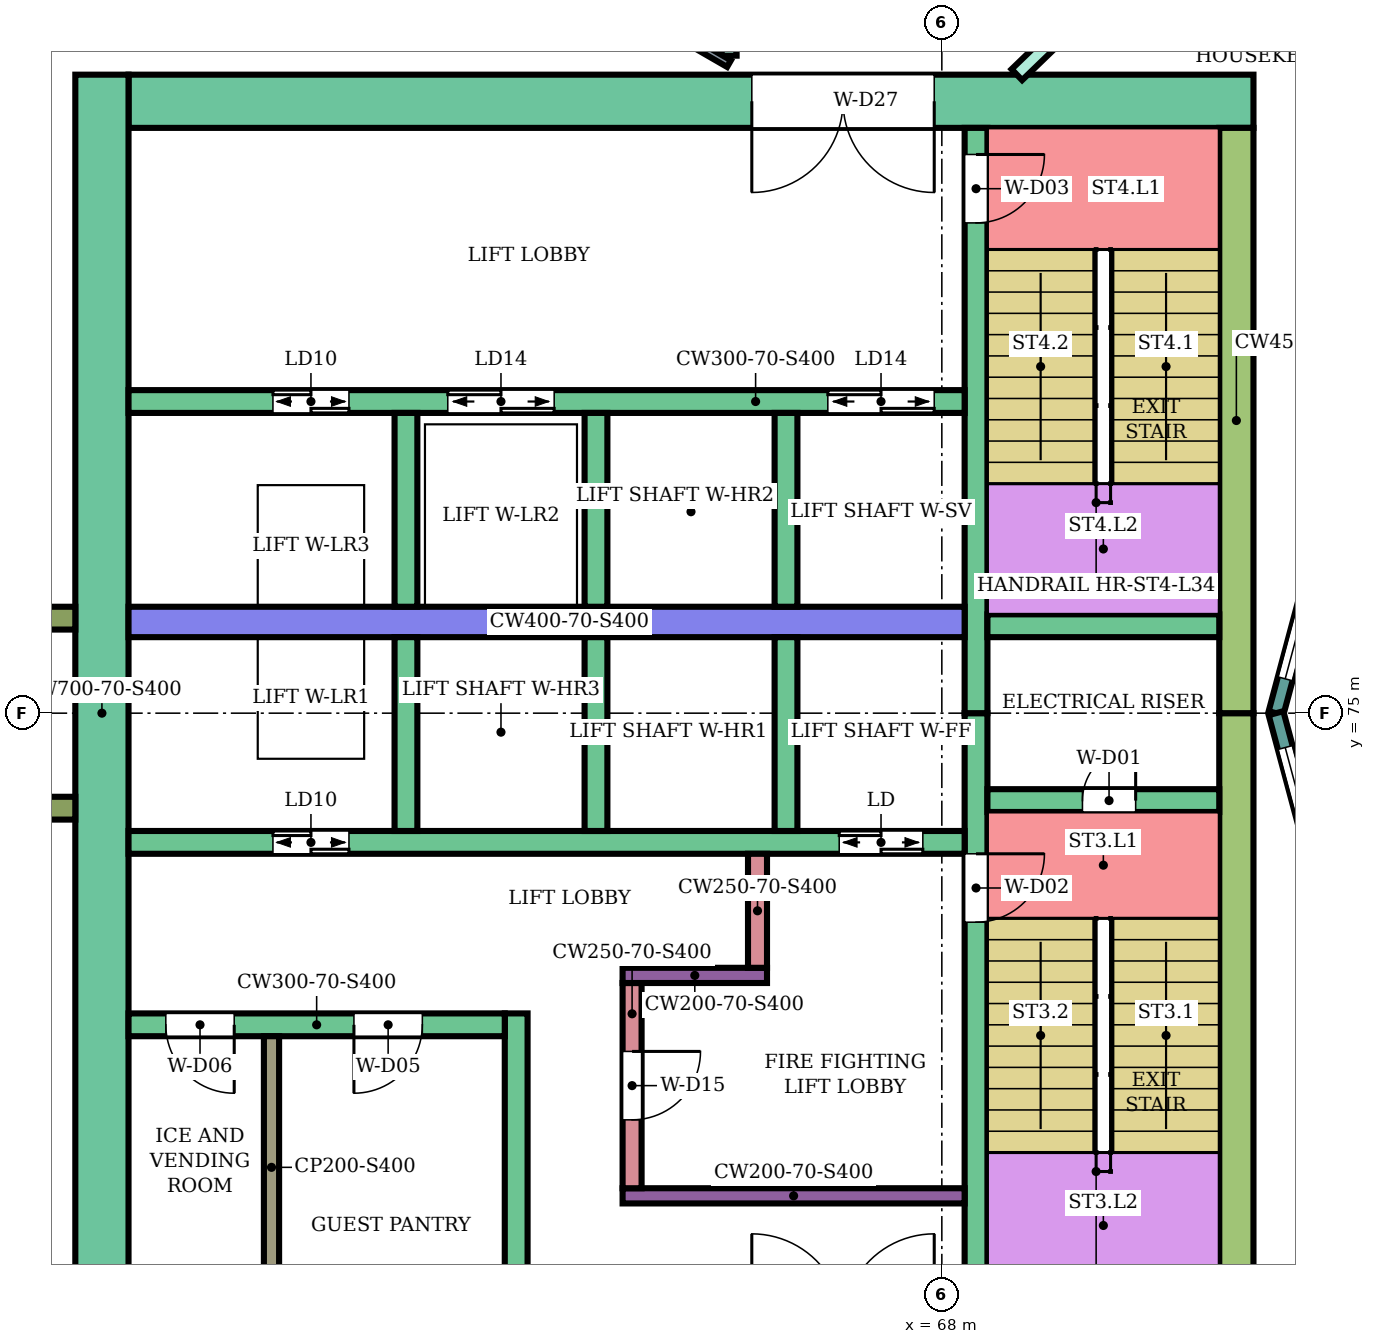
"""IFC4 building model, lengths in metres.
Left out: names, types, materials, properties, quantities, classifications, styles, units other than length and angle.
Written with IfcOpenShell. Run it as: python <this file> out.ifc"""

import sys

from ifc_helpers import new_model, si_unit, direction, frame, frame_2d, origin, place, context, subcontext, project, spatial, rectangle, extrude, element, fill, save


model = new_model("IFC4")
c1 = context("Model", 3, precision=1e-05, world=origin(), true_north=direction((0.0, 1.0)))
c2 = subcontext(c1, "Body", "Model", "MODEL_VIEW")
j1 = project(units=[si_unit("LENGTHUNIT", "METRE"), si_unit("PLANEANGLEUNIT", "RADIAN")], contexts=[c1])
p1 = place(None, origin())
s1 = spatial("IfcSite", under=j1, at=p1, CompositionType="ELEMENT")
p2 = place(p1, origin())
s2 = spatial("IfcBuilding", under=s1, at=p2, CompositionType="ELEMENT")
p3 = place(p2, frame((0.0, 0.0, 145.8)))
s3 = spatial("IfcBuildingStorey", under=s2, at=p3, CompositionType="ELEMENT", Elevation=145.8)
p4 = place(p3, frame((72.1, 83.05, 0.0), z_axis=(0.0, 0.0, 1.0), x_axis=(-1.0, 0.0, 0.0)))
e1 = element("IfcWall", 1, at=p4, inside=s3, PredefinedType="SHEAR", context=c2, shape_type="SweptSolid", body=[
    extrude(rectangle(XDim=14.8, YDim=0.7, at=frame_2d((7.4, 0.0))), origin(), (0.0, 0.0, 1.0), 3.5),
])
p5 = place(p4, frame((4.2, 0.0, 0.0)))
e2 = element("IfcOpeningElement", 2, at=p5, cuts=e1, PredefinedType="OPENING", context=c2, shape_type="SweptSolid", body=[
    extrude(rectangle(XDim=2.4, YDim=2.4, at=frame_2d((1.2, 1.2))), frame((0.0, 0.36, 0.0), z_axis=(0.0, -1.0, 0.0), x_axis=(1.0, 0.0, 0.0)), (0.0, 0.0, 1.0), 0.72),
])
for number, where, z_axis, x_axis in (
    (3, (71.875, 75.0, 0.0), (0.0, 0.0, 1.0), (0.0, -1.0, 0.0)),
    (4, (71.875, 82.7, 0.0), (0.0, 0.0, 1.0), (0.0, -1.0, 0.0)),
):
    element("IfcWall", number, at=place(p3, frame(where, z_axis=z_axis, x_axis=x_axis)), inside=s3, PredefinedType="SHEAR", context=c2, shape_type="SweptSolid", body=[
        extrude(rectangle(XDim=7.7, YDim=0.45, at=frame_2d((3.85, 0.0))), origin(), (0.0, 0.0, 1.0), 3.5),
    ])
p6 = place(p3, frame((56.95, 83.4, 0.0), z_axis=(0.0, 0.0, 1.0), x_axis=(0.0, -1.0, 0.0)))
e5 = element("IfcWall", 5, at=p6, inside=s3, PredefinedType="SHEAR", context=c2, shape_type="SweptSolid", body=[
    extrude(rectangle(XDim=16.8, YDim=0.7, at=frame_2d((8.4, 0.0))), origin(), (0.0, 0.0, 1.0), 3.5),
])
p7 = place(p3, frame((68.45, 75.0, 0.0), z_axis=(0.0, 0.0, 1.0), x_axis=(0.0, -1.0, 0.0)))
e6 = element("IfcWall", 6, at=p7, inside=s3, PredefinedType="SHEAR", context=c2, shape_type="SweptSolid", body=[
    extrude(rectangle(XDim=7.7, YDim=0.3, at=frame_2d((3.85, 0.0))), origin(), (0.0, 0.0, 1.0), 3.5),
])
p8 = place(p7, frame((1.85, 0.0, 0.0)))
e7 = element("IfcOpeningElement", 7, at=p8, cuts=e6, PredefinedType="OPENING", context=c2, shape_type="SweptSolid", body=[
    extrude(rectangle(XDim=0.9, YDim=2.1, at=frame_2d((0.45, 1.05))), frame((0.0, 0.16, 0.0), z_axis=(0.0, -1.0, 0.0), x_axis=(1.0, 0.0, 0.0)), (0.0, 0.0, 1.0), 0.32),
])
p9 = place(p3, frame((68.45, 82.7, 0.0), z_axis=(0.0, 0.0, 1.0), x_axis=(0.0, -1.0, 0.0)))
e8 = element("IfcWall", 8, at=p9, inside=s3, PredefinedType="SHEAR", context=c2, shape_type="SweptSolid", body=[
    extrude(rectangle(XDim=7.7, YDim=0.3, at=frame_2d((3.85, 0.0))), origin(), (0.0, 0.0, 1.0), 3.5),
])
p10 = place(p9, frame((0.35, 0.0, 0.0)))
e9 = element("IfcOpeningElement", 9, at=p10, cuts=e8, PredefinedType="OPENING", context=c2, shape_type="SweptSolid", body=[
    extrude(rectangle(XDim=0.9, YDim=2.1, at=frame_2d((0.45, 1.05))), frame((0.0, 0.16, 0.0), z_axis=(0.0, -1.0, 0.0), x_axis=(1.0, 0.0, 0.0)), (0.0, 0.0, 1.0), 0.32),
])
p11 = place(p3, frame((71.65, 73.85, 0.0), z_axis=(0.0, 0.0, 1.0), x_axis=(-1.0, 0.0, 0.0)))
e10 = element("IfcWall", 10, at=p11, inside=s3, PredefinedType="SHEAR", context=c2, shape_type="SweptSolid", body=[
    extrude(rectangle(XDim=3.05, YDim=0.3, at=frame_2d((1.525, 0.0))), origin(), (0.0, 0.0, 1.0), 3.5),
])
p12 = place(p11, frame((1.1, 0.0, 0.0)))
e11 = element("IfcOpeningElement", 11, at=p12, cuts=e10, PredefinedType="OPENING", context=c2, shape_type="SweptSolid", body=[
    extrude(rectangle(XDim=0.7, YDim=2.0, at=frame_2d((0.35, 1.0))), frame((0.0, 0.16, 0.0), z_axis=(0.0, -1.0, 0.0), x_axis=(1.0, 0.0, 0.0)), (0.0, 0.0, 1.0), 0.32),
])
p13 = place(p3, frame((71.65, 76.15, 0.0), z_axis=(0.0, 0.0, 1.0), x_axis=(-1.0, 0.0, 0.0)))
e12 = element("IfcWall", 12, at=p13, inside=s3, PredefinedType="SHEAR", context=c2, shape_type="SweptSolid", body=[
    extrude(rectangle(XDim=3.05, YDim=0.3, at=frame_2d((1.525, 0.0))), origin(), (0.0, 0.0, 1.0), 3.5),
])
p14 = place(p3, frame((68.3, 73.3, 0.0), z_axis=(0.0, 0.0, 1.0), x_axis=(-1.0, 0.0, 0.0)))
e13 = element("IfcWall", 13, at=p14, inside=s3, PredefinedType="SHEAR", context=c2, shape_type="SweptSolid", body=[
    extrude(rectangle(XDim=11.0, YDim=0.3, at=frame_2d((5.5, 0.0))), origin(), (0.0, 0.0, 1.0), 3.5),
])
p15 = place(p14, frame((0.55, 0.0, 0.0)))
e14 = element("IfcOpeningElement", 14, at=p15, cuts=e13, PredefinedType="OPENING", context=c2, shape_type="SweptSolid", body=[
    extrude(rectangle(XDim=1.1, YDim=2.1, at=frame_2d((0.55, 1.05))), frame((0.0, 0.16, 0.0), z_axis=(0.0, -1.0, 0.0), x_axis=(1.0, 0.0, 0.0)), (0.0, 0.0, 1.0), 0.32),
])
p16 = place(p14, frame((8.1, 0.0, 0.0)))
e15 = element("IfcOpeningElement", 15, at=p16, cuts=e13, PredefinedType="OPENING", context=c2, shape_type="SweptSolid", body=[
    extrude(rectangle(XDim=1.0, YDim=2.1, at=frame_2d((0.5, 1.05))), frame((0.0, 0.16, 0.0), z_axis=(0.0, -1.0, 0.0), x_axis=(1.0, 0.0, 0.0)), (0.0, 0.0, 1.0), 0.32),
])
p17 = place(p3, frame((68.3, 76.2, 0.0), z_axis=(0.0, 0.0, 1.0), x_axis=(-1.0, 0.0, 0.0)))
e16 = element("IfcWall", 16, at=p17, inside=s3, PredefinedType="SHEAR", context=c2, shape_type="SweptSolid", body=[
    extrude(rectangle(XDim=11.0, YDim=0.4, at=frame_2d((5.5, 0.0))), origin(), (0.0, 0.0, 1.0), 3.5),
])
p18 = place(p3, frame((68.3, 79.1, 0.0), z_axis=(0.0, 0.0, 1.0), x_axis=(-1.0, 0.0, 0.0)))
e17 = element("IfcWall", 17, at=p18, inside=s3, PredefinedType="SHEAR", context=c2, shape_type="SweptSolid", body=[
    extrude(rectangle(XDim=11.0, YDim=0.3, at=frame_2d((5.5, 0.0))), origin(), (0.0, 0.0, 1.0), 3.5),
])
p19 = place(p18, frame((0.4, 0.0, 0.0)))
e18 = element("IfcOpeningElement", 18, at=p19, cuts=e17, PredefinedType="OPENING", context=c2, shape_type="SweptSolid", body=[
    extrude(rectangle(XDim=1.4, YDim=2.1, at=frame_2d((0.7, 1.05))), frame((0.0, 0.16, 0.0), z_axis=(0.0, -1.0, 0.0), x_axis=(1.0, 0.0, 0.0)), (0.0, 0.0, 1.0), 0.32),
])
p20 = place(p18, frame((5.4, 0.0, 0.0)))
e19 = element("IfcOpeningElement", 19, at=p20, cuts=e17, PredefinedType="OPENING", context=c2, shape_type="SweptSolid", body=[
    extrude(rectangle(XDim=1.4, YDim=2.1, at=frame_2d((0.7, 1.05))), frame((0.0, 0.16, 0.0), z_axis=(0.0, -1.0, 0.0), x_axis=(1.0, 0.0, 0.0)), (0.0, 0.0, 1.0), 0.32),
])
p21 = place(p18, frame((8.1, 0.0, 0.0)))
e20 = element("IfcOpeningElement", 20, at=p21, cuts=e17, PredefinedType="OPENING", context=c2, shape_type="SweptSolid", body=[
    extrude(rectangle(XDim=1.0, YDim=2.1, at=frame_2d((0.5, 1.05))), frame((0.0, 0.16, 0.0), z_axis=(0.0, -1.0, 0.0), x_axis=(1.0, 0.0, 0.0)), (0.0, 0.0, 1.0), 0.32),
])
for number, where, z_axis, x_axis in (
    (21, (65.95, 76.0, 0.0), (0.0, 0.0, 1.0), (0.0, -1.0, 0.0)),
    (22, (63.45, 76.0, 0.0), (0.0, 0.0, 1.0), (0.0, -1.0, 0.0)),
    (23, (60.95, 76.0, 0.0), (0.0, 0.0, 1.0), (0.0, -1.0, 0.0)),
    (24, (65.95, 78.95, 0.0), (0.0, 0.0, 1.0), (0.0, -1.0, 0.0)),
    (25, (63.45, 78.95, 0.0), (0.0, 0.0, 1.0), (0.0, -1.0, 0.0)),
    (26, (60.95, 78.95, 0.0), (0.0, 0.0, 1.0), (0.0, -1.0, 0.0)),
):
    element("IfcWall", number, at=place(p3, frame(where, z_axis=z_axis, x_axis=x_axis)), inside=s3, PredefinedType="SHEAR", context=c2, shape_type="SweptSolid", body=[
        extrude(rectangle(XDim=2.55, YDim=0.3, at=frame_2d((1.275, 0.0))), origin(), (0.0, 0.0, 1.0), 3.5),
    ])
p22 = place(p3, frame((68.3, 68.65, 0.0), z_axis=(0.0, 0.0, 1.0), x_axis=(-1.0, 0.0, 0.0)))
e27 = element("IfcWall", 27, at=p22, inside=s3, PredefinedType="SHEAR", context=c2, shape_type="SweptSolid", body=[
    extrude(rectangle(XDim=4.5, YDim=0.2, at=frame_2d((2.25, 0.0))), origin(), (0.0, 0.0, 1.0), 3.5),
])
p23 = place(p3, frame((63.925, 71.45, 0.0), z_axis=(0.0, 0.0, 1.0), x_axis=(0.0, -1.0, 0.0)))
e28 = element("IfcWall", 28, at=p23, inside=s3, PredefinedType="SHEAR", context=c2, shape_type="SweptSolid", body=[
    extrude(rectangle(XDim=2.7, YDim=0.25, at=frame_2d((1.35, 0.0))), origin(), (0.0, 0.0, 1.0), 3.5),
])
p24 = place(p23, frame((0.9, 0.0, 0.0)))
e29 = element("IfcOpeningElement", 29, at=p24, cuts=e28, PredefinedType="OPENING", context=c2, shape_type="SweptSolid", body=[
    extrude(rectangle(XDim=0.9, YDim=2.1, at=frame_2d((0.45, 1.05))), frame((0.0, 0.135, 0.0), z_axis=(0.0, -1.0, 0.0), x_axis=(1.0, 0.0, 0.0)), (0.0, 0.0, 1.0), 0.27),
])
p25 = place(p3, frame((65.7, 71.55, 0.0), z_axis=(0.0, 0.0, 1.0), x_axis=(-1.0, 0.0, 0.0)))
e30 = element("IfcWall", 30, at=p25, inside=s3, PredefinedType="SHEAR", context=c2, shape_type="SweptSolid", body=[
    extrude(rectangle(XDim=1.9, YDim=0.2, at=frame_2d((0.95, 0.0))), origin(), (0.0, 0.0, 1.0), 3.5),
])
p26 = place(p3, frame((65.575, 73.15, 0.0), z_axis=(0.0, 0.0, 1.0), x_axis=(0.0, -1.0, 0.0)))
e31 = element("IfcWall", 31, at=p26, inside=s3, PredefinedType="SHEAR", context=c2, shape_type="SweptSolid", body=[
    extrude(rectangle(XDim=1.5, YDim=0.25, at=frame_2d((0.75, 0.0))), origin(), (0.0, 0.0, 1.0), 3.5),
])
p27 = place(p3, frame((62.4, 71.05, 0.0), z_axis=(0.0, 0.0, 1.0), x_axis=(0.0, -1.0, 0.0)))
e32 = element("IfcWall", 32, at=p27, inside=s3, PredefinedType="SHEAR", context=c2, shape_type="SweptSolid", body=[
    extrude(rectangle(XDim=3.75, YDim=0.3, at=frame_2d((1.875, 0.0))), origin(), (0.0, 0.0, 1.0), 3.5),
])
p28 = place(p3, frame((62.25, 70.9, 0.0), z_axis=(0.0, 0.0, 1.0), x_axis=(-1.0, 0.0, 0.0)))
e33 = element("IfcWall", 33, at=p28, inside=s3, PredefinedType="SHEAR", context=c2, shape_type="SweptSolid", body=[
    extrude(rectangle(XDim=4.95, YDim=0.3, at=frame_2d((2.475, 0.0))), origin(), (0.0, 0.0, 1.0), 3.5),
])
p29 = place(p28, frame((1.084, 0.0, 0.0)))
e34 = element("IfcOpeningElement", 34, at=p29, cuts=e33, PredefinedType="OPENING", context=c2, shape_type="SweptSolid", body=[
    extrude(rectangle(XDim=0.9, YDim=2.1, at=frame_2d((0.45, 1.05))), frame((0.0, 0.16, 0.0), z_axis=(0.0, -1.0, 0.0), x_axis=(1.0, 0.0, 0.0)), (0.0, 0.0, 1.0), 0.32),
])
p30 = place(p28, frame((3.56, 0.0, 0.0)))
e35 = element("IfcOpeningElement", 35, at=p30, cuts=e33, PredefinedType="OPENING", context=c2, shape_type="SweptSolid", body=[
    extrude(rectangle(XDim=0.9, YDim=2.1, at=frame_2d((0.45, 1.05))), frame((0.0, 0.16, 0.0), z_axis=(0.0, -1.0, 0.0), x_axis=(1.0, 0.0, 0.0)), (0.0, 0.0, 1.0), 0.32),
])
for number, where, z_axis, x_axis in (
    (36, (56.6, 76.25, 0.0), (0.0, 0.0, 1.0), (-1.0, 0.0, 0.0)),
    (37, (56.6, 73.75, 0.0), (0.0, 0.0, 1.0), (-1.0, 0.0, 0.0)),
):
    element("IfcWall", number, at=place(p3, frame(where, z_axis=z_axis, x_axis=x_axis)), inside=s3, PredefinedType="NOTDEFINED", context=c2, shape_type="SweptSolid", body=[
        extrude(rectangle(XDim=2.416, YDim=0.3, at=frame_2d((1.208, 0.0))), origin(), (0.0, 0.0, 1.0), 3.9),
    ])
p31 = place(p3, frame((73.415, 78.802, 0.0), z_axis=(0.0, 0.0, 1.0), x_axis=(-0.258789828301, -0.965933654434, 0.0)))
e38 = element("IfcWall", 38, at=p31, inside=s3, PredefinedType="NOTDEFINED", context=c2, shape_type="SweptSolid", body=[
    extrude(rectangle(XDim=3.936, YDim=0.2, at=frame_2d((1.968, 0.0))), origin(), (0.0, 0.0, 1.0), 3.9),
])
p32 = place(p31, frame((0.468, 0.0, 0.9)))
e39 = element("IfcOpeningElement", 39, at=p32, cuts=e38, PredefinedType="OPENING", context=c2, shape_type="SweptSolid", body=[
    extrude(rectangle(XDim=3.0, YDim=2.3, at=frame_2d((1.5, 1.15))), frame((0.0, 0.11, 0.0), z_axis=(0.0, -1.0, 0.0), x_axis=(1.0, 0.0, 0.0)), (0.0, 0.0, 1.0), 0.22),
])
p33 = place(p3, frame((72.396, 75.0, 0.0), z_axis=(0.0, 0.0, 1.0), x_axis=(0.258789828301, -0.965933654434, 0.0)))
e40 = element("IfcWall", 40, at=p33, inside=s3, PredefinedType="NOTDEFINED", context=c2, shape_type="SweptSolid", body=[
    extrude(rectangle(XDim=3.936, YDim=0.2, at=frame_2d((1.968, 0.0))), origin(), (0.0, 0.0, 1.0), 3.9),
])
p34 = place(p33, frame((0.468, 0.0, 0.9)))
e41 = element("IfcOpeningElement", 41, at=p34, cuts=e40, PredefinedType="OPENING", context=c2, shape_type="SweptSolid", body=[
    extrude(rectangle(XDim=3.0, YDim=2.3, at=frame_2d((1.5, 1.15))), frame((0.0, 0.11, 0.0), z_axis=(0.0, -1.0, 0.0), x_axis=(1.0, 0.0, 0.0)), (0.0, 0.0, 1.0), 0.22),
])
p35 = place(p3, frame((65.2, 83.65, 0.0), z_axis=(0.0, 0.0, 1.0), x_axis=(0.0, 1.0, 0.0)))
e42 = element("IfcWall", 42, at=p35, inside=s3, PredefinedType="PARTITIONING", context=c2, shape_type="SweptSolid", body=[
    extrude(rectangle(XDim=1.15, YDim=0.2, at=frame_2d((0.575, 0.0))), origin(), (0.0, 0.0, 1.0), 3.45),
])
p36 = place(p3, frame((68.987, 83.4, 0.0), z_axis=(0.0, 0.0, 1.0), x_axis=(0.719547721855, 0.694442996922, 0.0)))
e43 = element("IfcWall", 43, at=p36, inside=s3, PredefinedType="PARTITIONING", context=c2, shape_type="SweptSolid", body=[
    extrude(rectangle(XDim=5.378, YDim=0.2, at=frame_2d((2.689, 0.0))), origin(), (0.0, 0.0, 1.0), 3.45),
])
p37 = place(p36, frame((2.294, 0.0, 0.0)))
e44 = element("IfcOpeningElement", 44, at=p37, cuts=e43, PredefinedType="OPENING", context=c2, shape_type="SweptSolid", body=[
    extrude(rectangle(XDim=0.9, YDim=2.1, at=frame_2d((0.45, 1.05))), frame((0.0, 0.11, 0.0), z_axis=(0.0, -1.0, 0.0), x_axis=(1.0, 0.0, 0.0)), (0.0, 0.0, 1.0), 0.22),
])
p38 = place(p3, frame((57.659, 87.899, 0.0), z_axis=(0.0, 0.0, 1.0), x_axis=(0.86602264145, -0.500004784474, 0.0)))
e45 = element("IfcWall", 45, at=p38, inside=s3, PredefinedType="PARTITIONING", context=c2, shape_type="SweptSolid", body=[
    extrude(rectangle(XDim=8.708, YDim=0.1, at=frame_2d((4.354, 0.0))), origin(), (0.0, 0.0, 1.0), 3.45),
])
p39 = place(p38, frame((3.929, 0.0, 0.0)))
e46 = element("IfcOpeningElement", 46, at=p39, cuts=e45, PredefinedType="OPENING", context=c2, shape_type="SweptSolid", body=[
    extrude(rectangle(XDim=0.9, YDim=2.1, at=frame_2d((0.45, 1.05))), frame((0.0, 0.06, 0.0), z_axis=(0.0, -1.0, 0.0), x_axis=(1.0, 0.0, 0.0)), (0.0, 0.0, 1.0), 0.12),
])
p40 = place(p3, frame((59.181, 70.75, 0.0), z_axis=(0.0, 0.0, 1.0), x_axis=(0.0, -1.0, 0.0)))
e47 = element("IfcWall", 47, at=p40, inside=s3, PredefinedType="PARTITIONING", context=c2, shape_type="SweptSolid", body=[
    extrude(rectangle(XDim=3.45, YDim=0.2, at=frame_2d((1.725, 0.0))), origin(), (0.0, 0.0, 1.0), 3.5),
])
p41 = place(p32, origin())
e48 = element("IfcWindow", 48, at=p41, inside=s3, PartitioningType="SINGLE_PANEL", PredefinedType="WINDOW", context=c2, shape_type="SweptSolid", body=[
    extrude(rectangle(XDim=3.0, YDim=2.3, at=frame_2d((1.5, 1.15))), frame((0.0, 0.03, 0.0), z_axis=(0.0, -1.0, 0.0), x_axis=(1.0, 0.0, 0.0)), (0.0, 0.0, 1.0), 0.06),
])
fill(e39, e48)
p42 = place(p34, origin())
e49 = element("IfcWindow", 49, at=p42, inside=s3, PartitioningType="SINGLE_PANEL", PredefinedType="WINDOW", context=c2, shape_type="SweptSolid", body=[
    extrude(rectangle(XDim=3.0, YDim=2.3, at=frame_2d((1.5, 1.15))), frame((0.0, 0.03, 0.0), z_axis=(0.0, -1.0, 0.0), x_axis=(1.0, 0.0, 0.0)), (0.0, 0.0, 1.0), 0.06),
])
fill(e41, e49)
p43 = place(p12, frame((0.7, 0.0, 0.0), z_axis=(0.0, 0.0, 1.0), x_axis=(-1.0, 0.0, 0.0)))
e50 = element("IfcDoor", 50, at=p43, inside=s3, OperationType="SINGLE_SWING_RIGHT", PredefinedType="DOOR", context=c2, shape_type="SweptSolid", body=[
    extrude(rectangle(XDim=0.7, YDim=2.0, at=frame_2d((0.35, 1.0))), frame((0.0, 0.025, 0.0), z_axis=(0.0, -1.0, 0.0), x_axis=(1.0, 0.0, 0.0)), (0.0, 0.0, 1.0), 0.05),
])
fill(e11, e50)
p44 = place(p8, origin())
e51 = element("IfcDoor", 51, at=p44, inside=s3, OperationType="SINGLE_SWING_LEFT", PredefinedType="DOOR", context=c2, shape_type="SweptSolid", body=[
    extrude(rectangle(XDim=0.9, YDim=2.1, at=frame_2d((0.45, 1.05))), frame((0.0, 0.025, 0.0), z_axis=(0.0, -1.0, 0.0), x_axis=(1.0, 0.0, 0.0)), (0.0, 0.0, 1.0), 0.05),
])
fill(e7, e51)
p45 = place(p10, origin())
e52 = element("IfcDoor", 52, at=p45, inside=s3, OperationType="SINGLE_SWING_LEFT", PredefinedType="DOOR", context=c2, shape_type="SweptSolid", body=[
    extrude(rectangle(XDim=0.9, YDim=2.1, at=frame_2d((0.45, 1.05))), frame((0.0, 0.025, 0.0), z_axis=(0.0, -1.0, 0.0), x_axis=(1.0, 0.0, 0.0)), (0.0, 0.0, 1.0), 0.05),
])
fill(e9, e52)
p46 = place(p15, origin())
e53 = element("IfcDoor", 53, at=p46, inside=s3, OperationType="DOUBLE_DOOR_SLIDING", PredefinedType="DOOR", context=c2, shape_type="SweptSolid", body=[
    extrude(rectangle(XDim=1.1, YDim=2.1, at=frame_2d((0.55, 1.05))), frame((0.0, 0.025, 0.0), z_axis=(0.0, -1.0, 0.0), x_axis=(1.0, 0.0, 0.0)), (0.0, 0.0, 1.0), 0.05),
])
fill(e14, e53)
p47 = place(p16, origin())
e54 = element("IfcDoor", 54, at=p47, inside=s3, OperationType="DOUBLE_DOOR_SLIDING", PredefinedType="DOOR", context=c2, shape_type="SweptSolid", body=[
    extrude(rectangle(XDim=1.0, YDim=2.1, at=frame_2d((0.5, 1.05))), frame((0.0, 0.025, 0.0), z_axis=(0.0, -1.0, 0.0), x_axis=(1.0, 0.0, 0.0)), (0.0, 0.0, 1.0), 0.05),
])
fill(e15, e54)
p48 = place(p19, origin())
e55 = element("IfcDoor", 55, at=p48, inside=s3, OperationType="DOUBLE_DOOR_SLIDING", PredefinedType="DOOR", context=c2, shape_type="SweptSolid", body=[
    extrude(rectangle(XDim=1.4, YDim=2.1, at=frame_2d((0.7, 1.05))), frame((0.0, 0.025, 0.0), z_axis=(0.0, -1.0, 0.0), x_axis=(1.0, 0.0, 0.0)), (0.0, 0.0, 1.0), 0.05),
])
fill(e18, e55)
p49 = place(p20, origin())
e56 = element("IfcDoor", 56, at=p49, inside=s3, OperationType="DOUBLE_DOOR_SLIDING", PredefinedType="DOOR", context=c2, shape_type="SweptSolid", body=[
    extrude(rectangle(XDim=1.4, YDim=2.1, at=frame_2d((0.7, 1.05))), frame((0.0, 0.025, 0.0), z_axis=(0.0, -1.0, 0.0), x_axis=(1.0, 0.0, 0.0)), (0.0, 0.0, 1.0), 0.05),
])
fill(e19, e56)
p50 = place(p21, origin())
e57 = element("IfcDoor", 57, at=p50, inside=s3, OperationType="DOUBLE_DOOR_SLIDING", PredefinedType="DOOR", context=c2, shape_type="SweptSolid", body=[
    extrude(rectangle(XDim=1.0, YDim=2.1, at=frame_2d((0.5, 1.05))), frame((0.0, 0.025, 0.0), z_axis=(0.0, -1.0, 0.0), x_axis=(1.0, 0.0, 0.0)), (0.0, 0.0, 1.0), 0.05),
])
fill(e20, e57)
p51 = place(p24, origin())
e58 = element("IfcDoor", 58, at=p51, inside=s3, OperationType="SINGLE_SWING_LEFT", PredefinedType="DOOR", context=c2, shape_type="SweptSolid", body=[
    extrude(rectangle(XDim=0.9, YDim=2.1, at=frame_2d((0.45, 1.05))), frame((0.0, 0.025, 0.0), z_axis=(0.0, -1.0, 0.0), x_axis=(1.0, 0.0, 0.0)), (0.0, 0.0, 1.0), 0.05),
])
fill(e29, e58)
p52 = place(p29, origin())
e59 = element("IfcDoor", 59, at=p52, inside=s3, OperationType="SINGLE_SWING_RIGHT", PredefinedType="DOOR", context=c2, shape_type="SweptSolid", body=[
    extrude(rectangle(XDim=0.9, YDim=2.1, at=frame_2d((0.45, 1.05))), frame((0.0, 0.025, 0.0), z_axis=(0.0, -1.0, 0.0), x_axis=(1.0, 0.0, 0.0)), (0.0, 0.0, 1.0), 0.05),
])
fill(e34, e59)
p53 = place(p30, origin())
e60 = element("IfcDoor", 60, at=p53, inside=s3, OperationType="SINGLE_SWING_LEFT", PredefinedType="DOOR", context=c2, shape_type="SweptSolid", body=[
    extrude(rectangle(XDim=0.9, YDim=2.1, at=frame_2d((0.45, 1.05))), frame((0.0, 0.025, 0.0), z_axis=(0.0, -1.0, 0.0), x_axis=(1.0, 0.0, 0.0)), (0.0, 0.0, 1.0), 0.05),
])
fill(e35, e60)
p54 = place(p5, origin())
e61 = element("IfcDoor", 61, at=p54, inside=s3, OperationType="DOUBLE_DOOR_SINGLE_SWING", PredefinedType="DOOR", context=c2, shape_type="SweptSolid", body=[
    extrude(rectangle(XDim=2.4, YDim=2.4, at=frame_2d((1.2, 1.2))), frame((0.0, 0.025, 0.0), z_axis=(0.0, -1.0, 0.0), x_axis=(1.0, 0.0, 0.0)), (0.0, 0.0, 1.0), 0.05),
])
fill(e2, e61)
save(model, sys.argv[1])
